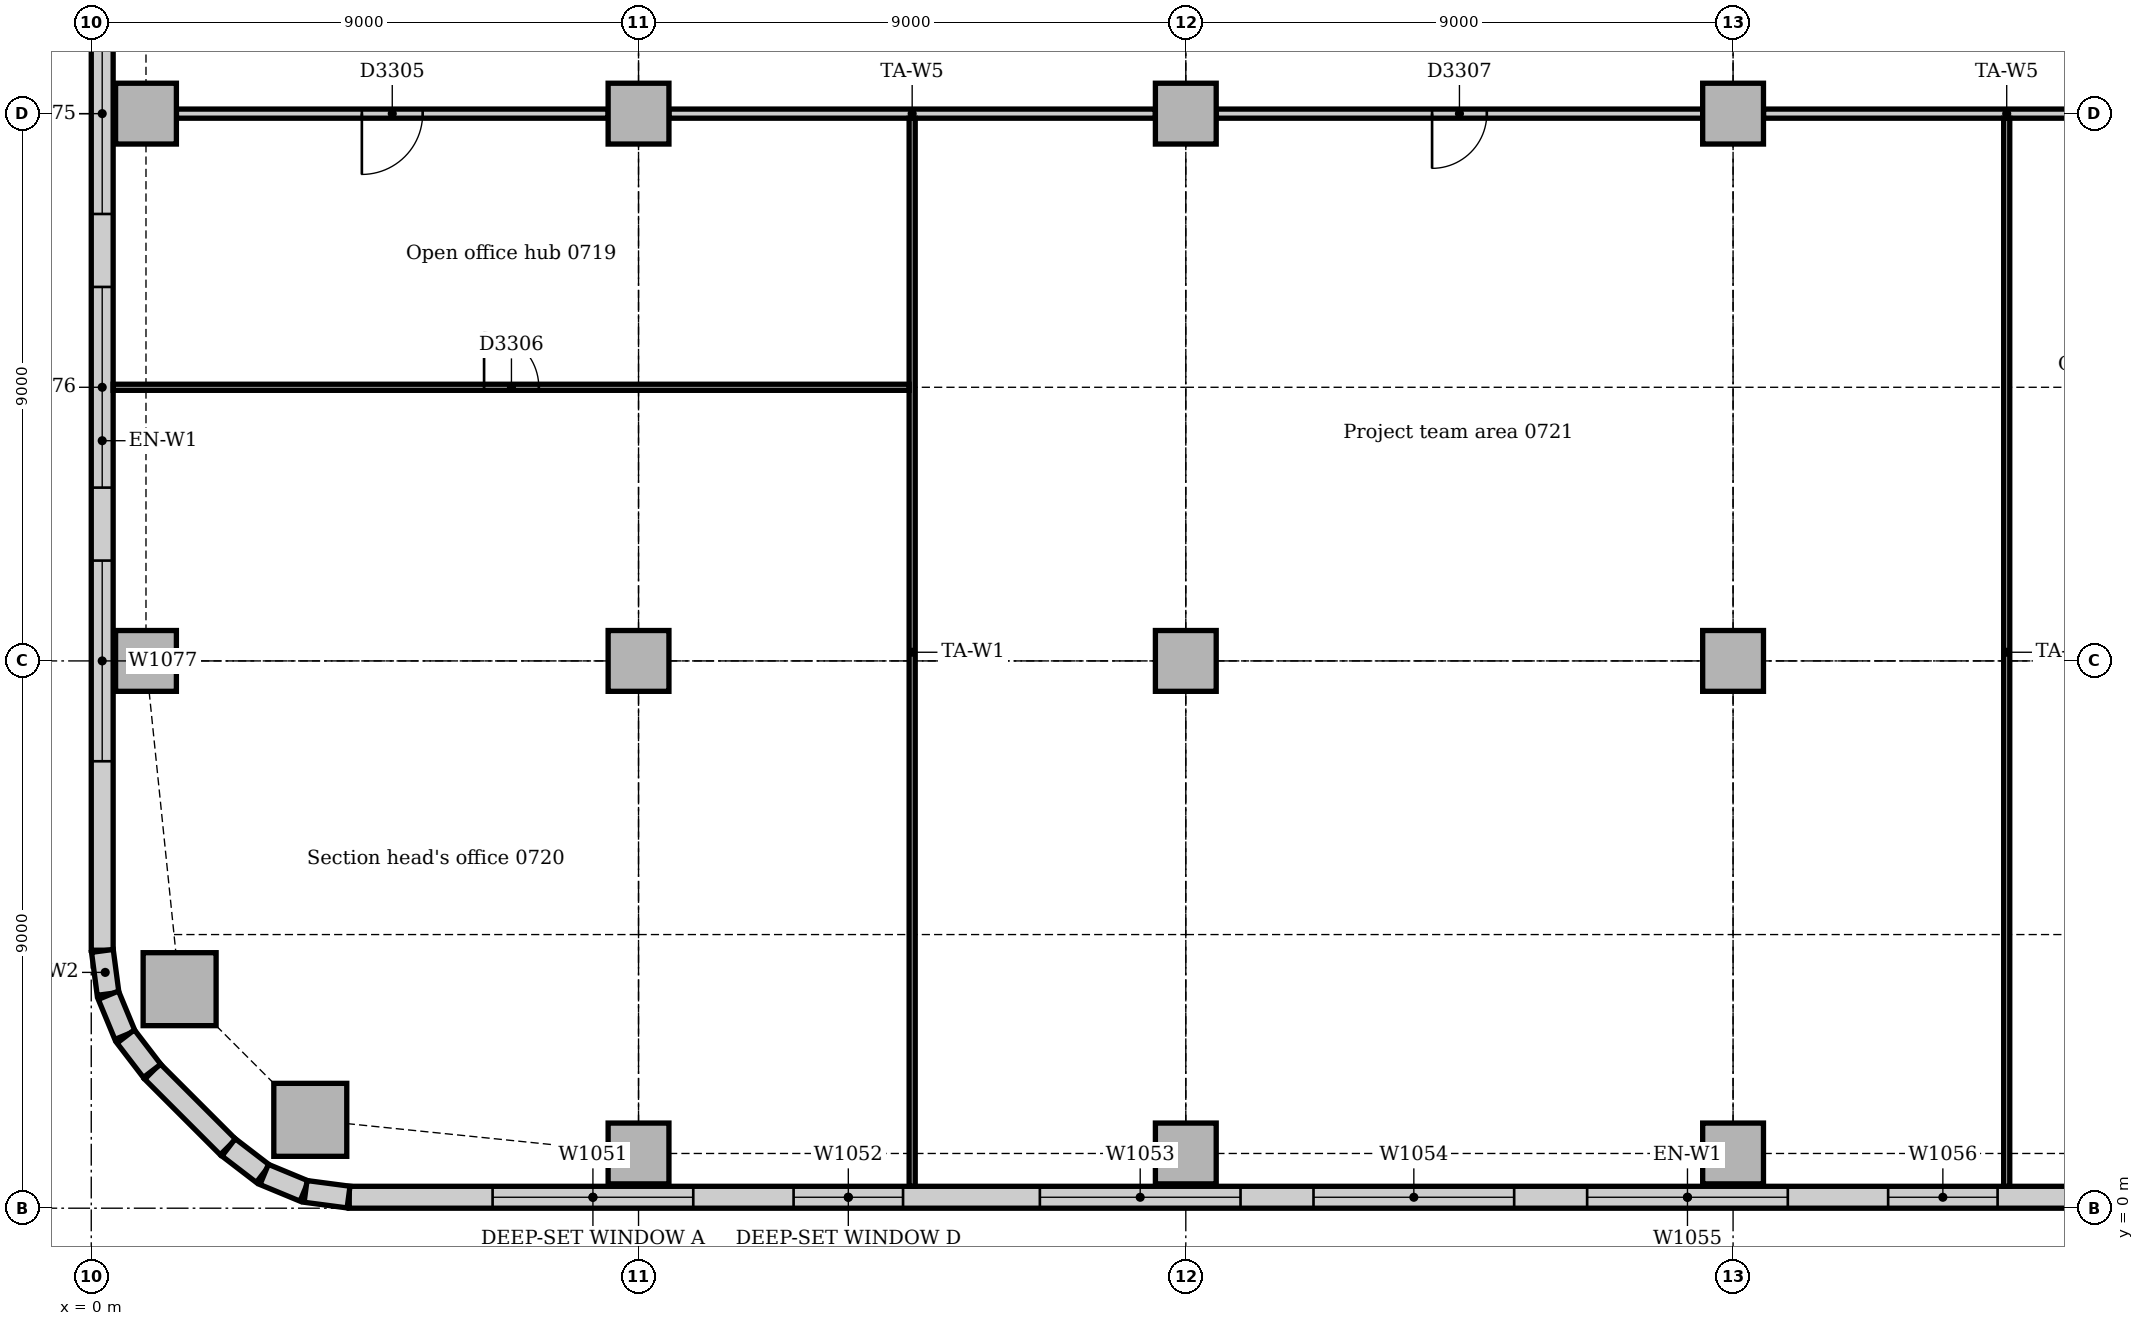
"""IFC4 building model, lengths in metres.
Left out: names, types, materials, properties, quantities, classifications, styles, units other than length and angle.
Written with IfcOpenShell. Run it as: python <this file> out.ifc"""

import sys

from ifc_helpers import new_model, si_unit, direction, frame, frame_2d, origin, origin_2d, place, context, subcontext, project, spatial, rectangle, extrude, element, fill, save


model = new_model("IFC4")
c1 = context("Model", 3, precision=1e-05, world=origin(), true_north=direction((0.0, 1.0)))
c2 = subcontext(c1, "Body", "Model", "MODEL_VIEW")
j1 = project(units=[si_unit("LENGTHUNIT", "METRE"), si_unit("PLANEANGLEUNIT", "RADIAN")], contexts=[c1])
p1 = place(None, origin())
s1 = spatial("IfcSite", under=j1, at=p1, CompositionType="ELEMENT")
p2 = place(p1, origin())
s2 = spatial("IfcBuilding", under=s1, at=p2, CompositionType="ELEMENT")
p3 = place(p2, frame((0.0, 0.0, 34.0)))
s3 = spatial("IfcBuildingStorey", under=s2, at=p3, CompositionType="ELEMENT", Elevation=34.0)
for number, where, z_axis, x_axis in (
    (1, (3.602, 1.453, 0.0), (0.0, 0.0, 1.0), (1.0, 0.0, 0.0)),
    (2, (1.453, 3.602, 0.0), (0.0, 0.0, 1.0), (1.0, 0.0, 0.0)),
):
    element("IfcColumn", number, at=place(p3, frame(where, z_axis=z_axis, x_axis=x_axis)), inside=s3, PredefinedType="COLUMN", context=c2, shape_type="SweptSolid", body=[
        extrude(rectangle(XDim=1.2, YDim=1.2, at=origin_2d()), origin(), (0.0, 0.0, 1.0), 3.85),
    ])
for number, where, z_axis, x_axis in (
    (3, (9.0, 0.9, 0.0), (0.0, 0.0, 1.0), (1.0, 0.0, 0.0)),
    (4, (18.0, 0.9, 0.0), (0.0, 0.0, 1.0), (1.0, 0.0, 0.0)),
    (5, (27.0, 0.9, 0.0), (0.0, 0.0, 1.0), (1.0, 0.0, 0.0)),
    (6, (0.9, 9.0, 0.0), (0.0, 0.0, 1.0), (1.0, 0.0, 0.0)),
    (7, (0.9, 18.0, 0.0), (0.0, 0.0, 1.0), (1.0, 0.0, 0.0)),
    (8, (9.0, 9.0, 0.0), (0.0, 0.0, 1.0), (1.0, 0.0, 0.0)),
    (9, (9.0, 18.0, 0.0), (0.0, 0.0, 1.0), (1.0, 0.0, 0.0)),
    (10, (18.0, 9.0, 0.0), (0.0, 0.0, 1.0), (1.0, 0.0, 0.0)),
    (11, (18.0, 18.0, 0.0), (0.0, 0.0, 1.0), (1.0, 0.0, 0.0)),
    (12, (27.0, 9.0, 0.0), (0.0, 0.0, 1.0), (1.0, 0.0, 0.0)),
    (13, (27.0, 18.0, 0.0), (0.0, 0.0, 1.0), (1.0, 0.0, 0.0)),
):
    element("IfcColumn", number, at=place(p3, frame(where, z_axis=z_axis, x_axis=x_axis)), inside=s3, PredefinedType="COLUMN", context=c2, shape_type="SweptSolid", body=[
        extrude(rectangle(XDim=1.0, YDim=1.0, at=origin_2d()), origin(), (0.0, 0.0, 1.0), 3.85),
    ])
p4 = place(p3, frame((4.243, 0.18, 0.0), z_axis=(0.0, 0.0, 1.0), x_axis=(1.0, 0.0, 0.0)))
e14 = element("IfcWall", 14, at=p4, inside=s3, PredefinedType="STANDARD", context=c2, shape_type="SweptSolid", body=[
    extrude(rectangle(XDim=44.015, YDim=0.36, at=frame_2d((22.007, 0.0))), origin(), (0.0, 0.0, 1.0), 3.85),
])
p5 = place(p4, frame((2.357, 0.0, 0.9)))
e15 = element("IfcOpeningElement", 15, at=p5, cuts=e14, PredefinedType="OPENING", context=c2, shape_type="SweptSolid", body=[
    extrude(rectangle(XDim=3.3, YDim=1.6, at=frame_2d((1.65, 0.8))), frame((0.0, 0.19, 0.0), z_axis=(0.0, -1.0, 0.0), x_axis=(1.0, 0.0, 0.0)), (0.0, 0.0, 1.0), 0.38),
])
p6 = place(p4, frame((7.307, 0.0, 0.9)))
e16 = element("IfcOpeningElement", 16, at=p6, cuts=e14, PredefinedType="OPENING", context=c2, shape_type="SweptSolid", body=[
    extrude(rectangle(XDim=1.8, YDim=1.6, at=frame_2d((0.9, 0.8))), frame((0.0, 0.19, 0.0), z_axis=(0.0, -1.0, 0.0), x_axis=(1.0, 0.0, 0.0)), (0.0, 0.0, 1.0), 0.38),
])
p7 = place(p4, frame((11.357, 0.0, 0.9)))
e17 = element("IfcOpeningElement", 17, at=p7, cuts=e14, PredefinedType="OPENING", context=c2, shape_type="SweptSolid", body=[
    extrude(rectangle(XDim=3.3, YDim=1.6, at=frame_2d((1.65, 0.8))), frame((0.0, 0.19, 0.0), z_axis=(0.0, -1.0, 0.0), x_axis=(1.0, 0.0, 0.0)), (0.0, 0.0, 1.0), 0.38),
])
p8 = place(p4, frame((15.857, 0.0, 0.9)))
e18 = element("IfcOpeningElement", 18, at=p8, cuts=e14, PredefinedType="OPENING", context=c2, shape_type="SweptSolid", body=[
    extrude(rectangle(XDim=3.3, YDim=1.6, at=frame_2d((1.65, 0.8))), frame((0.0, 0.19, 0.0), z_axis=(0.0, -1.0, 0.0), x_axis=(1.0, 0.0, 0.0)), (0.0, 0.0, 1.0), 0.38),
])
p9 = place(p4, frame((20.357, 0.0, 0.9)))
e19 = element("IfcOpeningElement", 19, at=p9, cuts=e14, PredefinedType="OPENING", context=c2, shape_type="SweptSolid", body=[
    extrude(rectangle(XDim=3.3, YDim=1.6, at=frame_2d((1.65, 0.8))), frame((0.0, 0.19, 0.0), z_axis=(0.0, -1.0, 0.0), x_axis=(1.0, 0.0, 0.0)), (0.0, 0.0, 1.0), 0.38),
])
p10 = place(p4, frame((25.307, 0.0, 0.9)))
e20 = element("IfcOpeningElement", 20, at=p10, cuts=e14, PredefinedType="OPENING", context=c2, shape_type="SweptSolid", body=[
    extrude(rectangle(XDim=1.8, YDim=1.6, at=frame_2d((0.9, 0.8))), frame((0.0, 0.19, 0.0), z_axis=(0.0, -1.0, 0.0), x_axis=(1.0, 0.0, 0.0)), (0.0, 0.0, 1.0), 0.38),
])
p11 = place(p4, frame((29.357, 0.0, 0.9)))
e21 = element("IfcOpeningElement", 21, at=p11, cuts=e14, PredefinedType="OPENING", context=c2, shape_type="SweptSolid", body=[
    extrude(rectangle(XDim=3.3, YDim=1.6, at=frame_2d((1.65, 0.8))), frame((0.0, 0.19, 0.0), z_axis=(0.0, -1.0, 0.0), x_axis=(1.0, 0.0, 0.0)), (0.0, 0.0, 1.0), 0.38),
])
p12 = place(p4, frame((34.307, 0.0, 0.9)))
e22 = element("IfcOpeningElement", 22, at=p12, cuts=e14, PredefinedType="OPENING", context=c2, shape_type="SweptSolid", body=[
    extrude(rectangle(XDim=1.8, YDim=1.6, at=frame_2d((0.9, 0.8))), frame((0.0, 0.19, 0.0), z_axis=(0.0, -1.0, 0.0), x_axis=(1.0, 0.0, 0.0)), (0.0, 0.0, 1.0), 0.38),
])
p13 = place(p4, frame((38.357, 0.0, 0.9)))
e23 = element("IfcOpeningElement", 23, at=p13, cuts=e14, PredefinedType="OPENING", context=c2, shape_type="SweptSolid", body=[
    extrude(rectangle(XDim=3.3, YDim=1.6, at=frame_2d((1.65, 0.8))), frame((0.0, 0.19, 0.0), z_axis=(0.0, -1.0, 0.0), x_axis=(1.0, 0.0, 0.0)), (0.0, 0.0, 1.0), 0.38),
])
p14 = place(p3, frame((0.18, 21.0, 0.0), z_axis=(0.0, 0.0, 1.0), x_axis=(0.0, -1.0, 0.0)))
e24 = element("IfcWall", 24, at=p14, inside=s3, PredefinedType="STANDARD", context=c2, shape_type="SweptSolid", body=[
    extrude(rectangle(XDim=16.757, YDim=0.36, at=frame_2d((8.379, 0.0))), origin(), (0.0, 0.0, 1.0), 3.85),
])
p15 = place(p14, frame((1.35, 0.0, 0.9)))
e25 = element("IfcOpeningElement", 25, at=p15, cuts=e24, PredefinedType="OPENING", context=c2, shape_type="SweptSolid", body=[
    extrude(rectangle(XDim=3.3, YDim=1.6, at=frame_2d((1.65, 0.8))), frame((0.0, 0.19, 0.0), z_axis=(0.0, -1.0, 0.0), x_axis=(1.0, 0.0, 0.0)), (0.0, 0.0, 1.0), 0.38),
])
p16 = place(p14, frame((5.85, 0.0, 0.9)))
e26 = element("IfcOpeningElement", 26, at=p16, cuts=e24, PredefinedType="OPENING", context=c2, shape_type="SweptSolid", body=[
    extrude(rectangle(XDim=3.3, YDim=1.6, at=frame_2d((1.65, 0.8))), frame((0.0, 0.19, 0.0), z_axis=(0.0, -1.0, 0.0), x_axis=(1.0, 0.0, 0.0)), (0.0, 0.0, 1.0), 0.38),
])
p17 = place(p14, frame((10.35, 0.0, 0.9)))
e27 = element("IfcOpeningElement", 27, at=p17, cuts=e24, PredefinedType="OPENING", context=c2, shape_type="SweptSolid", body=[
    extrude(rectangle(XDim=3.3, YDim=1.6, at=frame_2d((1.65, 0.8))), frame((0.0, 0.19, 0.0), z_axis=(0.0, -1.0, 0.0), x_axis=(1.0, 0.0, 0.0)), (0.0, 0.0, 1.0), 0.38),
])
p18 = place(p3, frame((1.006, 2.249, 0.0), z_axis=(0.0, 0.0, 1.0), x_axis=(0.707106781187, -0.707106781187, 0.0)))
e28 = element("IfcWall", 28, at=p18, inside=s3, PredefinedType="STANDARD", context=c2, shape_type="SweptSolid", body=[
    extrude(rectangle(XDim=1.757, YDim=0.36, at=frame_2d((0.879, 0.0))), origin(), (0.0, 0.0, 1.0), 3.85),
])
for number, where, z_axis, x_axis in (
    (29, (0.183, 4.231, 0.0), (0.0, 0.0, 1.0), (0.131, -0.991, 0.0)),
    (30, (0.282, 3.503, 0.0), (0.0, 0.0, 1.0), (0.383, -0.924, 0.0)),
):
    element("IfcWall", number, at=place(p3, frame(where, z_axis=z_axis, x_axis=x_axis)), inside=s3, PredefinedType="STANDARD", context=c2, shape_type="SweptSolid", body=[
        extrude(rectangle(XDim=0.713, YDim=0.36, at=frame_2d((0.356, 0.0))), origin(), (0.0, 0.0, 1.0), 3.85),
    ])
for number, where, z_axis, x_axis in (
    (31, (0.566, 2.825, 0.0), (0.0, 0.0, 1.0), (0.609, -0.793, 0.0)),
    (32, (2.259, 1.0, 0.0), (0.0, 0.0, 1.0), (0.793, -0.609, 0.0)),
):
    element("IfcWall", number, at=place(p3, frame(where, z_axis=z_axis, x_axis=x_axis)), inside=s3, PredefinedType="STANDARD", context=c2, shape_type="SweptSolid", body=[
        extrude(rectangle(XDim=0.713, YDim=0.36, at=frame_2d((0.357, 0.0))), origin(), (0.0, 0.0, 1.0), 3.85),
    ])
for number, where, z_axis, x_axis in (
    (33, (2.844, 0.555, 0.0), (0.0, 0.0, 1.0), (0.924, -0.383, 0.0)),
    (34, (3.524, 0.276, 0.0), (0.0, 0.0, 1.0), (0.991, -0.131, 0.0)),
):
    element("IfcWall", number, at=place(p3, frame(where, z_axis=z_axis, x_axis=x_axis)), inside=s3, PredefinedType="STANDARD", context=c2, shape_type="SweptSolid", body=[
        extrude(rectangle(XDim=0.713, YDim=0.36, at=frame_2d((0.356, 0.0))), origin(), (0.0, 0.0, 1.0), 3.85),
    ])
p19 = place(p3, frame((27.5, 18.0, 0.0), z_axis=(0.0, 0.0, 1.0), x_axis=(1.0, 0.0, 0.0)))
e35 = element("IfcWall", 35, at=p19, inside=s3, PredefinedType="PARTITIONING", context=c2, shape_type="SweptSolid", body=[
    extrude(rectangle(XDim=8.0, YDim=0.15, at=frame_2d((4.0, 0.0))), origin(), (0.0, 0.0, 1.0), 3.15),
])
p20 = place(p3, frame((18.5, 18.0, 0.0), z_axis=(0.0, 0.0, 1.0), x_axis=(1.0, 0.0, 0.0)))
e36 = element("IfcWall", 36, at=p20, inside=s3, PredefinedType="PARTITIONING", context=c2, shape_type="SweptSolid", body=[
    extrude(rectangle(XDim=8.0, YDim=0.15, at=frame_2d((4.0, 0.0))), origin(), (0.0, 0.0, 1.0), 3.15),
])
p21 = place(p20, frame((3.55, 0.0, 0.0)))
e37 = element("IfcOpeningElement", 37, at=p21, cuts=e36, PredefinedType="OPENING", context=c2, shape_type="SweptSolid", body=[
    extrude(rectangle(XDim=0.9, YDim=2.1, at=frame_2d((0.45, 1.05))), frame((0.0, 0.085, 0.0), z_axis=(0.0, -1.0, 0.0), x_axis=(1.0, 0.0, 0.0)), (0.0, 0.0, 1.0), 0.17),
])
p22 = place(p3, frame((9.5, 18.0, 0.0), z_axis=(0.0, 0.0, 1.0), x_axis=(1.0, 0.0, 0.0)))
e38 = element("IfcWall", 38, at=p22, inside=s3, PredefinedType="PARTITIONING", context=c2, shape_type="SweptSolid", body=[
    extrude(rectangle(XDim=8.0, YDim=0.15, at=frame_2d((4.0, 0.0))), origin(), (0.0, 0.0, 1.0), 3.15),
])
p23 = place(p3, frame((1.4, 18.0, 0.0), z_axis=(0.0, 0.0, 1.0), x_axis=(1.0, 0.0, 0.0)))
e39 = element("IfcWall", 39, at=p23, inside=s3, PredefinedType="PARTITIONING", context=c2, shape_type="SweptSolid", body=[
    extrude(rectangle(XDim=7.1, YDim=0.15, at=frame_2d((3.55, 0.0))), origin(), (0.0, 0.0, 1.0), 3.15),
])
p24 = place(p23, frame((3.05, 0.0, 0.0)))
e40 = element("IfcOpeningElement", 40, at=p24, cuts=e39, PredefinedType="OPENING", context=c2, shape_type="SweptSolid", body=[
    extrude(rectangle(XDim=1.0, YDim=2.1, at=frame_2d((0.5, 1.05))), frame((0.0, 0.085, 0.0), z_axis=(0.0, -1.0, 0.0), x_axis=(1.0, 0.0, 0.0)), (0.0, 0.0, 1.0), 0.17),
])
for number, where, z_axis, x_axis in (
    (41, (13.5, 0.36, 0.0), (0.0, 0.0, 1.0), (0.0, 1.0, 0.0)),
    (42, (31.5, 0.36, 0.0), (0.0, 0.0, 1.0), (0.0, 1.0, 0.0)),
):
    element("IfcWall", number, at=place(p3, frame(where, z_axis=z_axis, x_axis=x_axis)), inside=s3, PredefinedType="PARTITIONING", context=c2, shape_type="SweptSolid", body=[
        extrude(rectangle(XDim=17.565, YDim=0.1, at=frame_2d((8.783, 0.0))), origin(), (0.0, 0.0, 1.0), 3.85),
    ])
p25 = place(p3, frame((0.36, 13.5, 0.0), z_axis=(0.0, 0.0, 1.0), x_axis=(1.0, 0.0, 0.0)))
e43 = element("IfcWall", 43, at=p25, inside=s3, PredefinedType="PARTITIONING", context=c2, shape_type="SweptSolid", body=[
    extrude(rectangle(XDim=13.09, YDim=0.1, at=frame_2d((6.545, 0.0))), origin(), (0.0, 0.0, 1.0), 3.35),
])
p26 = place(p25, frame((6.1, 0.0, 0.0)))
e44 = element("IfcOpeningElement", 44, at=p26, cuts=e43, PredefinedType="OPENING", context=c2, shape_type="SweptSolid", body=[
    extrude(rectangle(XDim=0.9, YDim=2.1, at=frame_2d((0.45, 1.05))), frame((0.0, 0.06, 0.0), z_axis=(0.0, -1.0, 0.0), x_axis=(1.0, 0.0, 0.0)), (0.0, 0.0, 1.0), 0.12),
])
p27 = place(p5, origin())
e45 = element("IfcWindow", 45, at=p27, inside=s3, PartitioningType="SINGLE_PANEL", PredefinedType="WINDOW", context=c2, shape_type="SweptSolid", body=[
    extrude(rectangle(XDim=3.3, YDim=1.6, at=frame_2d((1.65, 0.8))), frame((0.0, 0.13, 0.0), z_axis=(0.0, -1.0, 0.0), x_axis=(1.0, 0.0, 0.0)), (0.0, 0.0, 1.0), 0.06),
])
fill(e15, e45)
p28 = place(p6, origin())
e46 = element("IfcWindow", 46, at=p28, inside=s3, PartitioningType="SINGLE_PANEL", PredefinedType="WINDOW", context=c2, shape_type="SweptSolid", body=[
    extrude(rectangle(XDim=1.8, YDim=1.6, at=frame_2d((0.9, 0.8))), frame((0.0, 0.13, 0.0), z_axis=(0.0, -1.0, 0.0), x_axis=(1.0, 0.0, 0.0)), (0.0, 0.0, 1.0), 0.06),
])
fill(e16, e46)
p29 = place(p7, origin())
e47 = element("IfcWindow", 47, at=p29, inside=s3, PartitioningType="SINGLE_PANEL", PredefinedType="WINDOW", context=c2, shape_type="SweptSolid", body=[
    extrude(rectangle(XDim=3.3, YDim=1.6, at=frame_2d((1.65, 0.8))), frame((0.0, 0.13, 0.0), z_axis=(0.0, -1.0, 0.0), x_axis=(1.0, 0.0, 0.0)), (0.0, 0.0, 1.0), 0.06),
])
fill(e17, e47)
p30 = place(p8, origin())
e48 = element("IfcWindow", 48, at=p30, inside=s3, PartitioningType="SINGLE_PANEL", PredefinedType="WINDOW", context=c2, shape_type="SweptSolid", body=[
    extrude(rectangle(XDim=3.3, YDim=1.6, at=frame_2d((1.65, 0.8))), frame((0.0, 0.13, 0.0), z_axis=(0.0, -1.0, 0.0), x_axis=(1.0, 0.0, 0.0)), (0.0, 0.0, 1.0), 0.06),
])
fill(e18, e48)
p31 = place(p9, origin())
e49 = element("IfcWindow", 49, at=p31, inside=s3, PartitioningType="SINGLE_PANEL", PredefinedType="WINDOW", context=c2, shape_type="SweptSolid", body=[
    extrude(rectangle(XDim=3.3, YDim=1.6, at=frame_2d((1.65, 0.8))), frame((0.0, 0.13, 0.0), z_axis=(0.0, -1.0, 0.0), x_axis=(1.0, 0.0, 0.0)), (0.0, 0.0, 1.0), 0.06),
])
fill(e19, e49)
p32 = place(p10, origin())
e50 = element("IfcWindow", 50, at=p32, inside=s3, PartitioningType="SINGLE_PANEL", PredefinedType="WINDOW", context=c2, shape_type="SweptSolid", body=[
    extrude(rectangle(XDim=1.8, YDim=1.6, at=frame_2d((0.9, 0.8))), frame((0.0, 0.13, 0.0), z_axis=(0.0, -1.0, 0.0), x_axis=(1.0, 0.0, 0.0)), (0.0, 0.0, 1.0), 0.06),
])
fill(e20, e50)
p33 = place(p15, origin())
e51 = element("IfcWindow", 51, at=p33, inside=s3, PartitioningType="SINGLE_PANEL", PredefinedType="WINDOW", context=c2, shape_type="SweptSolid", body=[
    extrude(rectangle(XDim=3.3, YDim=1.6, at=frame_2d((1.65, 0.8))), frame((0.0, 0.13, 0.0), z_axis=(0.0, -1.0, 0.0), x_axis=(1.0, 0.0, 0.0)), (0.0, 0.0, 1.0), 0.06),
])
fill(e25, e51)
p34 = place(p16, origin())
e52 = element("IfcWindow", 52, at=p34, inside=s3, PartitioningType="SINGLE_PANEL", PredefinedType="WINDOW", context=c2, shape_type="SweptSolid", body=[
    extrude(rectangle(XDim=3.3, YDim=1.6, at=frame_2d((1.65, 0.8))), frame((0.0, 0.13, 0.0), z_axis=(0.0, -1.0, 0.0), x_axis=(1.0, 0.0, 0.0)), (0.0, 0.0, 1.0), 0.06),
])
fill(e26, e52)
p35 = place(p17, origin())
e53 = element("IfcWindow", 53, at=p35, inside=s3, PartitioningType="SINGLE_PANEL", PredefinedType="WINDOW", context=c2, shape_type="SweptSolid", body=[
    extrude(rectangle(XDim=3.3, YDim=1.6, at=frame_2d((1.65, 0.8))), frame((0.0, 0.13, 0.0), z_axis=(0.0, -1.0, 0.0), x_axis=(1.0, 0.0, 0.0)), (0.0, 0.0, 1.0), 0.06),
])
fill(e27, e53)
p36 = place(p24, frame((1.0, 0.0, 0.0), z_axis=(0.0, 0.0, 1.0), x_axis=(-1.0, 0.0, 0.0)))
e54 = element("IfcDoor", 54, at=p36, inside=s3, OperationType="SINGLE_SWING_RIGHT", PredefinedType="DOOR", context=c2, shape_type="SweptSolid", body=[
    extrude(rectangle(XDim=1.0, YDim=2.1, at=frame_2d((0.5, 1.05))), frame((0.0, 0.025, 0.0), z_axis=(0.0, -1.0, 0.0), x_axis=(1.0, 0.0, 0.0)), (0.0, 0.0, 1.0), 0.05),
])
fill(e40, e54)
p37 = place(p26, origin())
e55 = element("IfcDoor", 55, at=p37, inside=s3, OperationType="SINGLE_SWING_LEFT", PredefinedType="DOOR", context=c2, shape_type="SweptSolid", body=[
    extrude(rectangle(XDim=0.9, YDim=2.1, at=frame_2d((0.45, 1.05))), frame((0.0, 0.025, 0.0), z_axis=(0.0, -1.0, 0.0), x_axis=(1.0, 0.0, 0.0)), (0.0, 0.0, 1.0), 0.05),
])
fill(e44, e55)
p38 = place(p21, frame((0.9, 0.0, 0.0), z_axis=(0.0, 0.0, 1.0), x_axis=(-1.0, 0.0, 0.0)))
e56 = element("IfcDoor", 56, at=p38, inside=s3, OperationType="SINGLE_SWING_RIGHT", PredefinedType="DOOR", context=c2, shape_type="SweptSolid", body=[
    extrude(rectangle(XDim=0.9, YDim=2.1, at=frame_2d((0.45, 1.05))), frame((0.0, 0.025, 0.0), z_axis=(0.0, -1.0, 0.0), x_axis=(1.0, 0.0, 0.0)), (0.0, 0.0, 1.0), 0.05),
])
fill(e37, e56)
save(model, sys.argv[1])
